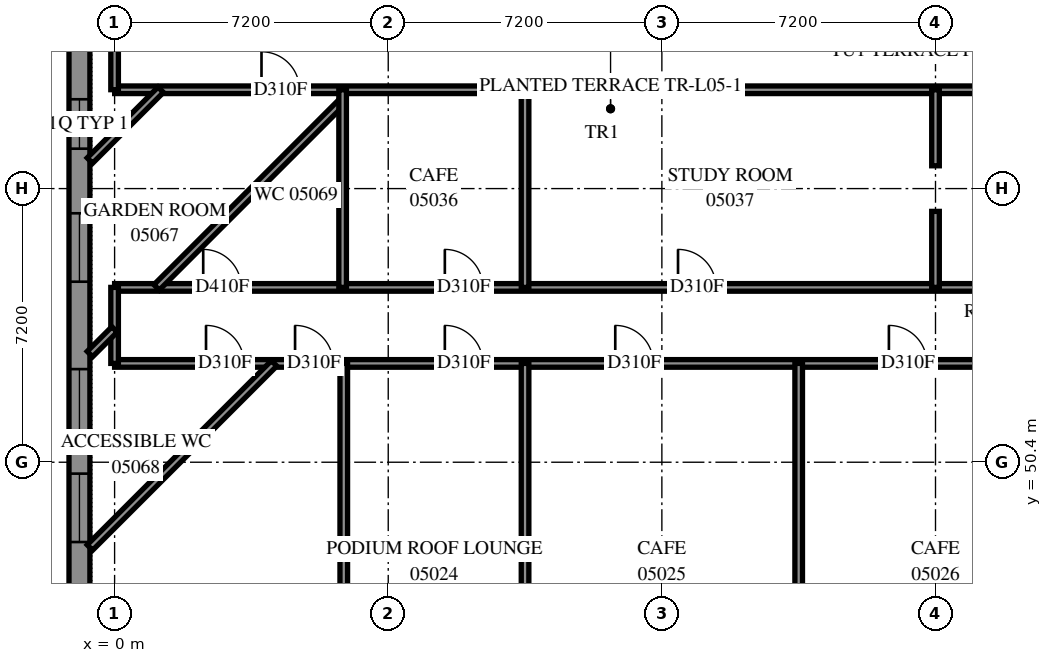
"""IFC4 building model, lengths in metres.
Left out: names, types, materials, properties, quantities, classifications, styles, units other than length and angle.
Written with IfcOpenShell. Run it as: python <this file> out.ifc"""

import sys

from ifc_helpers import new_model, si_unit, direction, frame, frame_2d, origin, place, context, subcontext, project, spatial, polyline, rectangle, outline, extrude, element, fill, save


model = new_model("IFC4")
c1 = context("Model", 3, precision=1e-05, world=origin(), true_north=direction((0.0, 1.0)))
c2 = subcontext(c1, "Body", "Model", "MODEL_VIEW")
j1 = project(units=[si_unit("LENGTHUNIT", "METRE"), si_unit("PLANEANGLEUNIT", "RADIAN")], contexts=[c1])
p1 = place(None, origin())
s1 = spatial("IfcSite", under=j1, at=p1, CompositionType="ELEMENT")
p2 = place(p1, origin())
s2 = spatial("IfcBuilding", under=s1, at=p2, CompositionType="ELEMENT")
p3 = place(p2, frame((0.0, 0.0, 22.8)))
s3 = spatial("IfcBuildingStorey", under=s2, at=p3, CompositionType="ELEMENT", Elevation=22.8)
p4 = place(p3, frame((-0.925, 71.725, 0.0), z_axis=(0.0, 0.0, 1.0), x_axis=(0.0, -1.0, 0.0)))
e1 = element("IfcWall", 1, at=p4, inside=s3, PredefinedType="SOLIDWALL", context=c2, shape_type="SweptSolid", body=[
    extrude(outline(polyline([(-0.275, -0.275), (28.525, -0.275), (27.975, 0.275), (0.275, 0.275), (-0.275, -0.275)])), origin(), (0.0, 0.0, 1.0), 3.9),
])
p5 = place(p4, frame((1.0, 0.0, 0.7)))
e2 = element("IfcOpeningElement", 2, at=p5, cuts=e1, PredefinedType="OPENING", context=c2, shape_type="SweptSolid", body=[
    extrude(rectangle(XDim=1.8, YDim=2.4, at=frame_2d((0.9, 1.2))), frame((0.0, 0.285, 0.0), z_axis=(0.0, -1.0, 0.0), x_axis=(1.0, 0.0, 0.0)), (0.0, 0.0, 1.0), 0.57),
])
p6 = place(p4, frame((4.225, 0.0, 0.7)))
e3 = element("IfcOpeningElement", 3, at=p6, cuts=e1, PredefinedType="OPENING", context=c2, shape_type="SweptSolid", body=[
    extrude(rectangle(XDim=1.8, YDim=2.4, at=frame_2d((0.9, 1.2))), frame((0.0, 0.285, 0.0), z_axis=(0.0, -1.0, 0.0), x_axis=(1.0, 0.0, 0.0)), (0.0, 0.0, 1.0), 0.57),
])
p7 = place(p4, frame((7.575, 0.0, 0.7)))
e4 = element("IfcOpeningElement", 4, at=p7, cuts=e1, PredefinedType="OPENING", context=c2, shape_type="SweptSolid", body=[
    extrude(rectangle(XDim=1.8, YDim=2.4, at=frame_2d((0.9, 1.2))), frame((0.0, 0.285, 0.0), z_axis=(0.0, -1.0, 0.0), x_axis=(1.0, 0.0, 0.0)), (0.0, 0.0, 1.0), 0.57),
])
p8 = place(p4, frame((14.775, 0.0, 0.7)))
e5 = element("IfcOpeningElement", 5, at=p8, cuts=e1, PredefinedType="OPENING", context=c2, shape_type="SweptSolid", body=[
    extrude(rectangle(XDim=1.8, YDim=2.4, at=frame_2d((0.9, 1.2))), frame((0.0, 0.285, 0.0), z_axis=(0.0, -1.0, 0.0), x_axis=(1.0, 0.0, 0.0)), (0.0, 0.0, 1.0), 0.57),
])
p9 = place(p4, frame((18.875, 0.0, 0.7)))
e6 = element("IfcOpeningElement", 6, at=p9, cuts=e1, PredefinedType="OPENING", context=c2, shape_type="SweptSolid", body=[
    extrude(rectangle(XDim=1.8, YDim=2.4, at=frame_2d((0.9, 1.2))), frame((0.0, 0.285, 0.0), z_axis=(0.0, -1.0, 0.0), x_axis=(1.0, 0.0, 0.0)), (0.0, 0.0, 1.0), 0.57),
])
p10 = place(p4, frame((21.625, 0.0, 0.7)))
e7 = element("IfcOpeningElement", 7, at=p10, cuts=e1, PredefinedType="OPENING", context=c2, shape_type="SweptSolid", body=[
    extrude(rectangle(XDim=1.8, YDim=2.4, at=frame_2d((0.9, 1.2))), frame((0.0, 0.285, 0.0), z_axis=(0.0, -1.0, 0.0), x_axis=(1.0, 0.0, 0.0)), (0.0, 0.0, 1.0), 0.57),
])
p11 = place(p4, frame((25.45, 0.0, 0.7)))
e8 = element("IfcOpeningElement", 8, at=p11, cuts=e1, PredefinedType="OPENING", context=c2, shape_type="SweptSolid", body=[
    extrude(rectangle(XDim=1.8, YDim=2.4, at=frame_2d((0.9, 1.2))), frame((0.0, 0.285, 0.0), z_axis=(0.0, -1.0, 0.0), x_axis=(1.0, 0.0, 0.0)), (0.0, 0.0, 1.0), 0.57),
])
p12 = place(p4, frame((11.775, 0.0, 0.45)))
e9 = element("IfcOpeningElement", 9, at=p12, cuts=e1, PredefinedType="OPENING", context=c2, shape_type="SweptSolid", body=[
    extrude(rectangle(XDim=1.3, YDim=2.5, at=frame_2d((0.65, 1.25))), frame((0.0, 0.285, 0.0), z_axis=(0.0, -1.0, 0.0), x_axis=(1.0, 0.0, 0.0)), (0.0, 0.0, 1.0), 0.57),
])
p13 = place(p3, frame((0.0, 55.0, 0.0), z_axis=(0.0, 0.0, 1.0), x_axis=(1.0, 0.0, 0.0)))
e10 = element("IfcWall", 10, at=p13, inside=s3, PredefinedType="PARTITIONING", context=c2, shape_type="SweptSolid", body=[
    extrude(rectangle(XDim=54.6, YDim=0.2, at=frame_2d((27.3, 0.0))), origin(), (0.0, 0.0, 1.0), 3.9),
])
p14 = place(p13, frame((8.689, 0.0, 0.0)))
e11 = element("IfcOpeningElement", 11, at=p14, cuts=e10, PredefinedType="OPENING", context=c2, shape_type="SweptSolid", body=[
    extrude(rectangle(XDim=1.0, YDim=2.1, at=frame_2d((0.5, 1.05))), frame((0.0, 0.11, 0.0), z_axis=(0.0, -1.0, 0.0), x_axis=(1.0, 0.0, 0.0)), (0.0, 0.0, 1.0), 0.22),
])
p15 = place(p13, frame((14.825, 0.0, 0.0)))
e12 = element("IfcOpeningElement", 12, at=p15, cuts=e10, PredefinedType="OPENING", context=c2, shape_type="SweptSolid", body=[
    extrude(rectangle(XDim=1.0, YDim=2.1, at=frame_2d((0.5, 1.05))), frame((0.0, 0.11, 0.0), z_axis=(0.0, -1.0, 0.0), x_axis=(1.0, 0.0, 0.0)), (0.0, 0.0, 1.0), 0.22),
])
p16 = place(p13, frame((27.284, 0.0, 0.0)))
e13 = element("IfcOpeningElement", 13, at=p16, cuts=e10, PredefinedType="OPENING", context=c2, shape_type="SweptSolid", body=[
    extrude(rectangle(XDim=1.0, YDim=2.1, at=frame_2d((0.5, 1.05))), frame((0.0, 0.11, 0.0), z_axis=(0.0, -1.0, 0.0), x_axis=(1.0, 0.0, 0.0)), (0.0, 0.0, 1.0), 0.22),
])
p17 = place(p13, frame((32.925, 0.0, 0.0)))
e14 = element("IfcOpeningElement", 14, at=p17, cuts=e10, PredefinedType="OPENING", context=c2, shape_type="SweptSolid", body=[
    extrude(rectangle(XDim=1.0, YDim=2.1, at=frame_2d((0.5, 1.05))), frame((0.0, 0.11, 0.0), z_axis=(0.0, -1.0, 0.0), x_axis=(1.0, 0.0, 0.0)), (0.0, 0.0, 1.0), 0.22),
])
p18 = place(p13, frame((38.075, 0.0, 0.0)))
e15 = element("IfcOpeningElement", 15, at=p18, cuts=e10, PredefinedType="OPENING", context=c2, shape_type="SweptSolid", body=[
    extrude(rectangle(XDim=1.0, YDim=2.1, at=frame_2d((0.5, 1.05))), frame((0.0, 0.11, 0.0), z_axis=(0.0, -1.0, 0.0), x_axis=(1.0, 0.0, 0.0)), (0.0, 0.0, 1.0), 0.22),
])
p19 = place(p13, frame((43.625, 0.0, 0.0)))
e16 = element("IfcOpeningElement", 16, at=p19, cuts=e10, PredefinedType="OPENING", context=c2, shape_type="SweptSolid", body=[
    extrude(rectangle(XDim=1.0, YDim=2.1, at=frame_2d((0.5, 1.05))), frame((0.0, 0.11, 0.0), z_axis=(0.0, -1.0, 0.0), x_axis=(1.0, 0.0, 0.0)), (0.0, 0.0, 1.0), 0.22),
])
p20 = place(p13, frame((52.752, 0.0, 0.0)))
e17 = element("IfcOpeningElement", 17, at=p20, cuts=e10, PredefinedType="OPENING", context=c2, shape_type="SweptSolid", body=[
    extrude(rectangle(XDim=1.0, YDim=2.1, at=frame_2d((0.5, 1.05))), frame((0.0, 0.11, 0.0), z_axis=(0.0, -1.0, 0.0), x_axis=(1.0, 0.0, 0.0)), (0.0, 0.0, 1.0), 0.22),
])
p21 = place(p13, frame((2.332, 0.0, 0.0)))
e18 = element("IfcOpeningElement", 18, at=p21, cuts=e10, PredefinedType="OPENING", context=c2, shape_type="SweptSolid", body=[
    extrude(rectangle(XDim=1.0, YDim=2.1, at=frame_2d((0.5, 1.05))), frame((0.0, 0.11, 0.0), z_axis=(0.0, -1.0, 0.0), x_axis=(1.0, 0.0, 0.0)), (0.0, 0.0, 1.0), 0.22),
])
p22 = place(p3, frame((0.0, 53.0, 0.0), z_axis=(0.0, 0.0, 1.0), x_axis=(1.0, 0.0, 0.0)))
e19 = element("IfcWall", 19, at=p22, inside=s3, PredefinedType="PARTITIONING", context=c2, shape_type="SweptSolid", body=[
    extrude(rectangle(XDim=54.6, YDim=0.2, at=frame_2d((27.3, 0.0))), origin(), (0.0, 0.0, 1.0), 3.9),
])
p23 = place(p22, frame((8.689, 0.0, 0.0)))
e20 = element("IfcOpeningElement", 20, at=p23, cuts=e19, PredefinedType="OPENING", context=c2, shape_type="SweptSolid", body=[
    extrude(rectangle(XDim=1.0, YDim=2.1, at=frame_2d((0.5, 1.05))), frame((0.0, 0.11, 0.0), z_axis=(0.0, -1.0, 0.0), x_axis=(1.0, 0.0, 0.0)), (0.0, 0.0, 1.0), 0.22),
])
p24 = place(p22, frame((13.174, 0.0, 0.0)))
e21 = element("IfcOpeningElement", 21, at=p24, cuts=e19, PredefinedType="OPENING", context=c2, shape_type="SweptSolid", body=[
    extrude(rectangle(XDim=1.0, YDim=2.1, at=frame_2d((0.5, 1.05))), frame((0.0, 0.11, 0.0), z_axis=(0.0, -1.0, 0.0), x_axis=(1.0, 0.0, 0.0)), (0.0, 0.0, 1.0), 0.22),
])
p25 = place(p22, frame((20.374, 0.0, 0.0)))
e22 = element("IfcOpeningElement", 22, at=p25, cuts=e19, PredefinedType="OPENING", context=c2, shape_type="SweptSolid", body=[
    extrude(rectangle(XDim=1.0, YDim=2.1, at=frame_2d((0.5, 1.05))), frame((0.0, 0.11, 0.0), z_axis=(0.0, -1.0, 0.0), x_axis=(1.0, 0.0, 0.0)), (0.0, 0.0, 1.0), 0.22),
])
p26 = place(p22, frame((27.574, 0.0, 0.0)))
e23 = element("IfcOpeningElement", 23, at=p26, cuts=e19, PredefinedType="OPENING", context=c2, shape_type="SweptSolid", body=[
    extrude(rectangle(XDim=1.0, YDim=2.1, at=frame_2d((0.5, 1.05))), frame((0.0, 0.11, 0.0), z_axis=(0.0, -1.0, 0.0), x_axis=(1.0, 0.0, 0.0)), (0.0, 0.0, 1.0), 0.22),
])
p27 = place(p22, frame((34.774, 0.0, 0.0)))
e24 = element("IfcOpeningElement", 24, at=p27, cuts=e19, PredefinedType="OPENING", context=c2, shape_type="SweptSolid", body=[
    extrude(rectangle(XDim=1.0, YDim=2.1, at=frame_2d((0.5, 1.05))), frame((0.0, 0.11, 0.0), z_axis=(0.0, -1.0, 0.0), x_axis=(1.0, 0.0, 0.0)), (0.0, 0.0, 1.0), 0.22),
])
p28 = place(p22, frame((41.974, 0.0, 0.0)))
e25 = element("IfcOpeningElement", 25, at=p28, cuts=e19, PredefinedType="OPENING", context=c2, shape_type="SweptSolid", body=[
    extrude(rectangle(XDim=1.0, YDim=2.1, at=frame_2d((0.5, 1.05))), frame((0.0, 0.11, 0.0), z_axis=(0.0, -1.0, 0.0), x_axis=(1.0, 0.0, 0.0)), (0.0, 0.0, 1.0), 0.22),
])
p29 = place(p22, frame((49.174, 0.0, 0.0)))
e26 = element("IfcOpeningElement", 26, at=p29, cuts=e19, PredefinedType="OPENING", context=c2, shape_type="SweptSolid", body=[
    extrude(rectangle(XDim=1.0, YDim=2.1, at=frame_2d((0.5, 1.05))), frame((0.0, 0.11, 0.0), z_axis=(0.0, -1.0, 0.0), x_axis=(1.0, 0.0, 0.0)), (0.0, 0.0, 1.0), 0.22),
])
p30 = place(p22, frame((2.406, 0.0, 0.0)))
e27 = element("IfcOpeningElement", 27, at=p30, cuts=e19, PredefinedType="OPENING", context=c2, shape_type="SweptSolid", body=[
    extrude(rectangle(XDim=1.0, YDim=2.1, at=frame_2d((0.5, 1.05))), frame((0.0, 0.11, 0.0), z_axis=(0.0, -1.0, 0.0), x_axis=(1.0, 0.0, 0.0)), (0.0, 0.0, 1.0), 0.22),
])
p31 = place(p22, frame((4.748, 0.0, 0.0)))
e28 = element("IfcOpeningElement", 28, at=p31, cuts=e19, PredefinedType="OPENING", context=c2, shape_type="SweptSolid", body=[
    extrude(rectangle(XDim=1.0, YDim=2.1, at=frame_2d((0.5, 1.05))), frame((0.0, 0.11, 0.0), z_axis=(0.0, -1.0, 0.0), x_axis=(1.0, 0.0, 0.0)), (0.0, 0.0, 1.0), 0.22),
])
p32 = place(p3, frame((0.002, 60.2, 0.0), z_axis=(0.0, 0.0, 1.0), x_axis=(1.0, 0.0, 0.0)))
e29 = element("IfcWall", 29, at=p32, inside=s3, PredefinedType="PARTITIONING", context=c2, shape_type="SweptSolid", body=[
    extrude(rectangle(XDim=54.598, YDim=0.2, at=frame_2d((27.299, 0.0))), origin(), (0.0, 0.0, 1.0), 3.9),
])
p33 = place(p32, frame((3.863, 0.0, 0.0)))
e30 = element("IfcOpeningElement", 30, at=p33, cuts=e29, PredefinedType="OPENING", context=c2, shape_type="SweptSolid", body=[
    extrude(rectangle(XDim=1.0, YDim=2.1, at=frame_2d((0.5, 1.05))), frame((0.0, 0.11, 0.0), z_axis=(0.0, -1.0, 0.0), x_axis=(1.0, 0.0, 0.0)), (0.0, 0.0, 1.0), 0.22),
])
for number, where, z_axis, x_axis in (
    (31, (6.03, 42.55, 0.0), (0.0, 0.0, 1.0), (0.0, 1.0, 0.0)),
    (32, (10.8, 42.55, 0.0), (0.0, 0.0, 1.0), (0.0, 1.0, 0.0)),
    (33, (18.0, 42.55, 0.0), (0.0, 0.0, 1.0), (0.0, 1.0, 0.0)),
):
    element("IfcWall", number, at=place(p3, frame(where, z_axis=z_axis, x_axis=x_axis)), inside=s3, PredefinedType="PARTITIONING", context=c2, shape_type="SweptSolid", body=[
        extrude(rectangle(XDim=10.45, YDim=0.2, at=frame_2d((5.225, 0.0))), origin(), (0.0, 0.0, 1.0), 3.9),
    ])
p34 = place(p3, frame((1.105, 55.001, 0.0), z_axis=(0.0, 0.0, 1.0), x_axis=(0.7071067812, 0.7071067812, 0.0)))
e34 = element("IfcWall", 34, at=p34, inside=s3, PredefinedType="PARTITIONING", context=c2, shape_type="SweptSolid", body=[
    extrude(rectangle(XDim=6.921, YDim=0.2, at=frame_2d((3.461, 0.0))), origin(), (0.0, 0.0, 1.0), 3.9),
])
p35 = place(p3, frame((-0.65, 48.154, 0.0), z_axis=(0.0, 0.0, 1.0), x_axis=(0.7070994865, 0.7071140758, 0.0)))
e35 = element("IfcWall", 35, at=p35, inside=s3, PredefinedType="PARTITIONING", context=c2, shape_type="SweptSolid", body=[
    extrude(rectangle(XDim=6.854, YDim=0.2, at=frame_2d((3.427, 0.0))), origin(), (0.0, 0.0, 1.0), 3.9),
])
for number, where, z_axis, x_axis in (
    (36, (6.0, 55.0, 0.0), (0.0, 0.0, 1.0), (0.0, 1.0, 0.0)),
    (37, (10.8, 55.0, 0.0), (0.0, 0.0, 1.0), (0.0, 1.0, 0.0)),
):
    element("IfcWall", number, at=place(p3, frame(where, z_axis=z_axis, x_axis=x_axis)), inside=s3, PredefinedType="PARTITIONING", context=c2, shape_type="SweptSolid", body=[
        extrude(rectangle(XDim=5.2, YDim=0.2, at=frame_2d((2.6, 0.0))), origin(), (0.0, 0.0, 1.0), 3.9),
    ])
p36 = place(p3, frame((-0.65, 58.337, 0.0), z_axis=(0.0, 0.0, 1.0), x_axis=(0.7071067812, 0.7071067812, 0.0)))
e38 = element("IfcWall", 38, at=p36, inside=s3, PredefinedType="PARTITIONING", context=c2, shape_type="SweptSolid", body=[
    extrude(rectangle(XDim=2.635, YDim=0.2, at=frame_2d((1.318, 0.0))), origin(), (0.0, 0.0, 1.0), 3.9),
])
for number, where, z_axis, x_axis in (
    (39, (0.0, 53.0, 0.0), (0.0, 0.0, 1.0), (0.0, 1.0, 0.0)),
    (40, (21.6, 55.0, 0.0), (0.0, 0.0, 1.0), (0.0, 1.0, 0.0)),
    (41, (21.6, 58.2, 0.0), (0.0, 0.0, 1.0), (0.0, 1.0, 0.0)),
):
    element("IfcWall", number, at=place(p3, frame(where, z_axis=z_axis, x_axis=x_axis)), inside=s3, PredefinedType="PARTITIONING", context=c2, shape_type="SweptSolid", body=[
        extrude(rectangle(XDim=2.0, YDim=0.2, at=frame_2d((1.0, 0.0))), origin(), (0.0, 0.0, 1.0), 3.9),
    ])
p37 = place(p3, frame((0.0, 60.202, 0.0), z_axis=(0.0, 0.0, 1.0), x_axis=(0.0, 1.0, 0.0)))
e42 = element("IfcWall", 42, at=p37, inside=s3, PredefinedType="PARTITIONING", context=c2, shape_type="SweptSolid", body=[
    extrude(rectangle(XDim=1.996, YDim=0.2, at=frame_2d((0.998, 0.0))), origin(), (0.0, 0.0, 1.0), 3.9),
])
p38 = place(p3, frame((-0.65, 53.246, 0.0), z_axis=(0.0, 0.0, 1.0), x_axis=(0.7071612431, 0.707052315, 0.0)))
e43 = element("IfcWall", 43, at=p38, inside=s3, PredefinedType="PARTITIONING", context=c2, shape_type="SweptSolid", body=[
    extrude(rectangle(XDim=0.918, YDim=0.2, at=frame_2d((0.459, 0.0))), origin(), (0.0, 0.0, 1.0), 3.9),
])
p39 = place(p8, origin())
e44 = element("IfcWindow", 44, at=p39, inside=s3, PartitioningType="SINGLE_PANEL", PredefinedType="WINDOW", context=c2, shape_type="SweptSolid", body=[
    extrude(rectangle(XDim=1.8, YDim=2.4, at=frame_2d((0.9, 1.2))), frame((0.0, 0.155, 0.0), z_axis=(0.0, -1.0, 0.0), x_axis=(1.0, 0.0, 0.0)), (0.0, 0.0, 1.0), 0.06),
])
fill(e5, e44)
p40 = place(p9, origin())
e45 = element("IfcWindow", 45, at=p40, inside=s3, PartitioningType="SINGLE_PANEL", PredefinedType="WINDOW", context=c2, shape_type="SweptSolid", body=[
    extrude(rectangle(XDim=1.8, YDim=2.4, at=frame_2d((0.9, 1.2))), frame((0.0, 0.155, 0.0), z_axis=(0.0, -1.0, 0.0), x_axis=(1.0, 0.0, 0.0)), (0.0, 0.0, 1.0), 0.06),
])
fill(e6, e45)
p41 = place(p10, origin())
e46 = element("IfcWindow", 46, at=p41, inside=s3, PartitioningType="SINGLE_PANEL", PredefinedType="WINDOW", context=c2, shape_type="SweptSolid", body=[
    extrude(rectangle(XDim=1.8, YDim=2.4, at=frame_2d((0.9, 1.2))), frame((0.0, 0.155, 0.0), z_axis=(0.0, -1.0, 0.0), x_axis=(1.0, 0.0, 0.0)), (0.0, 0.0, 1.0), 0.06),
])
fill(e7, e46)
p42 = place(p23, origin())
e47 = element("IfcDoor", 47, at=p42, inside=s3, OperationType="SINGLE_SWING_LEFT", PredefinedType="DOOR", context=c2, shape_type="SweptSolid", body=[
    extrude(rectangle(XDim=1.0, YDim=2.1, at=frame_2d((0.5, 1.05))), frame((0.0, 0.025, 0.0), z_axis=(0.0, -1.0, 0.0), x_axis=(1.0, 0.0, 0.0)), (0.0, 0.0, 1.0), 0.05),
])
fill(e20, e47)
p43 = place(p24, origin())
e48 = element("IfcDoor", 48, at=p43, inside=s3, OperationType="SINGLE_SWING_RIGHT", PredefinedType="DOOR", context=c2, shape_type="SweptSolid", body=[
    extrude(rectangle(XDim=1.0, YDim=2.1, at=frame_2d((0.5, 1.05))), frame((0.0, 0.025, 0.0), z_axis=(0.0, -1.0, 0.0), x_axis=(1.0, 0.0, 0.0)), (0.0, 0.0, 1.0), 0.05),
])
fill(e21, e48)
p44 = place(p25, origin())
e49 = element("IfcDoor", 49, at=p44, inside=s3, OperationType="SINGLE_SWING_RIGHT", PredefinedType="DOOR", context=c2, shape_type="SweptSolid", body=[
    extrude(rectangle(XDim=1.0, YDim=2.1, at=frame_2d((0.5, 1.05))), frame((0.0, 0.025, 0.0), z_axis=(0.0, -1.0, 0.0), x_axis=(1.0, 0.0, 0.0)), (0.0, 0.0, 1.0), 0.05),
])
fill(e22, e49)
p45 = place(p14, origin())
e50 = element("IfcDoor", 50, at=p45, inside=s3, OperationType="SINGLE_SWING_RIGHT", PredefinedType="DOOR", context=c2, shape_type="SweptSolid", body=[
    extrude(rectangle(XDim=1.0, YDim=2.1, at=frame_2d((0.5, 1.05))), frame((0.0, 0.025, 0.0), z_axis=(0.0, -1.0, 0.0), x_axis=(1.0, 0.0, 0.0)), (0.0, 0.0, 1.0), 0.05),
])
fill(e11, e50)
p46 = place(p15, origin())
e51 = element("IfcDoor", 51, at=p46, inside=s3, OperationType="SINGLE_SWING_LEFT", PredefinedType="DOOR", context=c2, shape_type="SweptSolid", body=[
    extrude(rectangle(XDim=1.0, YDim=2.1, at=frame_2d((0.5, 1.05))), frame((0.0, 0.025, 0.0), z_axis=(0.0, -1.0, 0.0), x_axis=(1.0, 0.0, 0.0)), (0.0, 0.0, 1.0), 0.05),
])
fill(e12, e51)
p47 = place(p33, origin())
e52 = element("IfcDoor", 52, at=p47, inside=s3, OperationType="SINGLE_SWING_LEFT", PredefinedType="DOOR", context=c2, shape_type="SweptSolid", body=[
    extrude(rectangle(XDim=1.0, YDim=2.1, at=frame_2d((0.5, 1.05))), frame((0.0, 0.025, 0.0), z_axis=(0.0, -1.0, 0.0), x_axis=(1.0, 0.0, 0.0)), (0.0, 0.0, 1.0), 0.05),
])
fill(e30, e52)
p48 = place(p30, origin())
e53 = element("IfcDoor", 53, at=p48, inside=s3, OperationType="SINGLE_SWING_RIGHT", PredefinedType="DOOR", context=c2, shape_type="SweptSolid", body=[
    extrude(rectangle(XDim=1.0, YDim=2.1, at=frame_2d((0.5, 1.05))), frame((0.0, 0.025, 0.0), z_axis=(0.0, -1.0, 0.0), x_axis=(1.0, 0.0, 0.0)), (0.0, 0.0, 1.0), 0.05),
])
fill(e27, e53)
p49 = place(p21, origin())
e54 = element("IfcDoor", 54, at=p49, inside=s3, OperationType="SINGLE_SWING_LEFT", PredefinedType="DOOR", context=c2, shape_type="SweptSolid", body=[
    extrude(rectangle(XDim=1.0, YDim=2.1, at=frame_2d((0.5, 1.05))), frame((0.0, 0.025, 0.0), z_axis=(0.0, -1.0, 0.0), x_axis=(1.0, 0.0, 0.0)), (0.0, 0.0, 1.0), 0.05),
])
fill(e18, e54)
p50 = place(p31, origin())
e55 = element("IfcDoor", 55, at=p50, inside=s3, OperationType="SINGLE_SWING_LEFT", PredefinedType="DOOR", context=c2, shape_type="SweptSolid", body=[
    extrude(rectangle(XDim=1.0, YDim=2.1, at=frame_2d((0.5, 1.05))), frame((0.0, 0.025, 0.0), z_axis=(0.0, -1.0, 0.0), x_axis=(1.0, 0.0, 0.0)), (0.0, 0.0, 1.0), 0.05),
])
fill(e28, e55)
p51 = place(p12, origin())
e56 = element("IfcWindow", 56, at=p51, inside=s3, PartitioningType="SINGLE_PANEL", PredefinedType="WINDOW", context=c2, shape_type="SweptSolid", body=[
    extrude(rectangle(XDim=1.3, YDim=2.5, at=frame_2d((0.65, 1.25))), frame((0.0, 0.155, 0.0), z_axis=(0.0, -1.0, 0.0), x_axis=(1.0, 0.0, 0.0)), (0.0, 0.0, 1.0), 0.06),
])
fill(e9, e56)
save(model, sys.argv[1])
